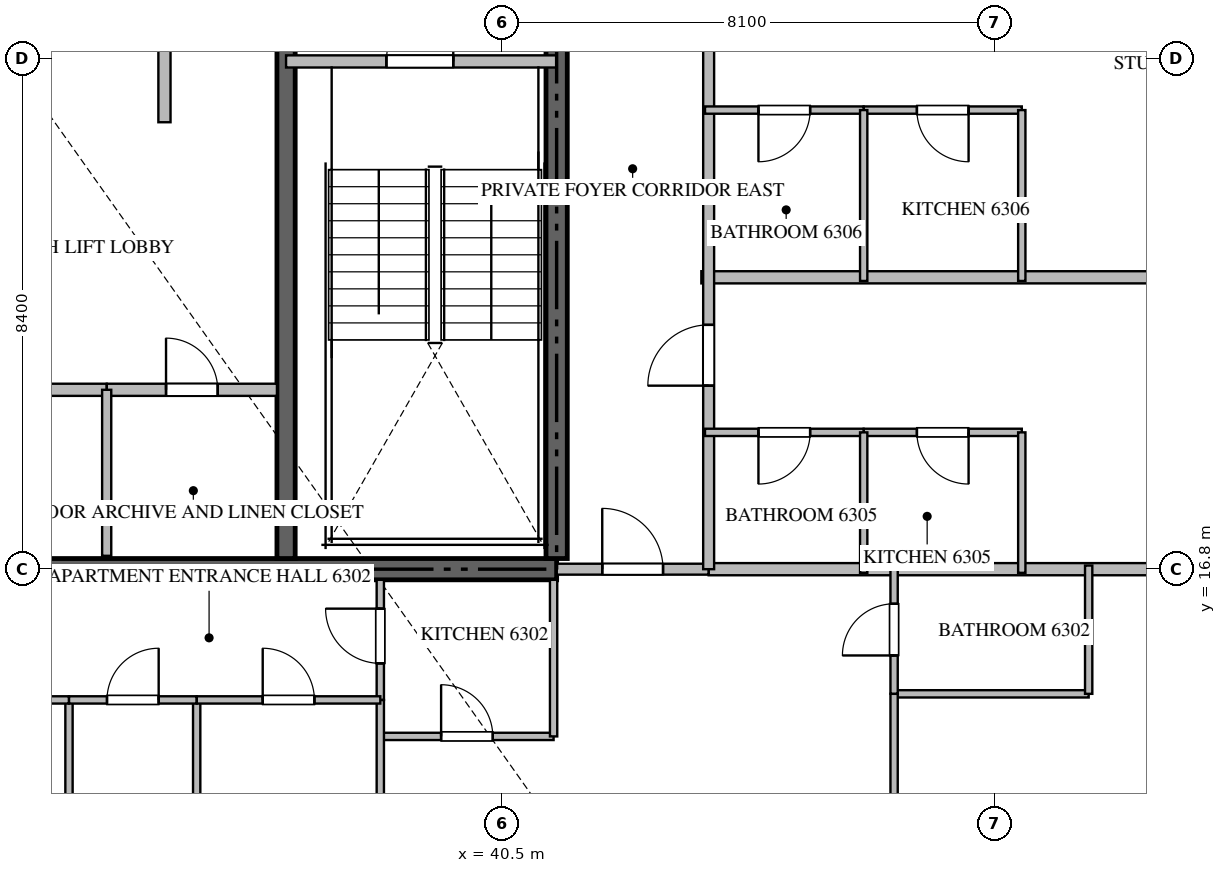
"""IFC4 building model, lengths in metres.
Left out: names, types, materials, properties, quantities, classifications, styles, units other than length and angle.
Written with IfcOpenShell. Run it as: python <this file> out.ifc"""

import sys

from ifc_helpers import new_model, si_unit, direction, frame, frame_2d, origin, place, context, subcontext, project, spatial, rectangle, extrude, source, transform, mapped, element, fill, save


model = new_model("IFC4")
c1 = context("Model", 3, precision=1e-05, world=origin(), true_north=direction((0.0, 1.0)))
c2 = subcontext(c1, "Body", "Model", "MODEL_VIEW")
j1 = project(units=[si_unit("LENGTHUNIT", "METRE"), si_unit("PLANEANGLEUNIT", "RADIAN")], contexts=[c1])
p1 = place(None, origin())
s1 = spatial("IfcSite", under=j1, at=p1, CompositionType="ELEMENT")
p2 = place(p1, origin())
s2 = spatial("IfcBuilding", under=s1, at=p2, CompositionType="ELEMENT")
p3 = place(p2, frame((0.0, 0.0, 252.8)))
s3 = spatial("IfcBuildingStorey", under=s2, at=p3, CompositionType="ELEMENT", Elevation=252.8)
p4 = place(p3, frame((23.4, 16.8, -0.26), z_axis=(0.0, 0.0, 1.0), x_axis=(1.0, 0.0, 0.0)))
e1 = element("IfcWall", 1, at=p4, inside=s3, PredefinedType="SHEAR", context=c2, shape_type="SweptSolid", body=[
    extrude(rectangle(XDim=18.0, YDim=0.35, at=frame_2d((9.0, 0.0))), origin(), (0.0, 0.0, 1.0), 3.848),
])
p5 = place(p3, frame((41.4, 16.975, -0.26), z_axis=(0.0, 0.0, 1.0), x_axis=(0.0, 1.0, 0.0)))
e2 = element("IfcWall", 2, at=p5, inside=s3, PredefinedType="SHEAR", context=c2, shape_type="SweptSolid", body=[
    extrude(rectangle(XDim=8.375, YDim=0.35, at=frame_2d((4.188, 0.0))), origin(), (0.0, 0.0, 1.0), 3.848),
])
p6 = place(p3, frame((36.95, 16.975, -0.26), z_axis=(0.0, 0.0, 1.0), x_axis=(0.0, 1.0, 0.0)))
e3 = element("IfcWall", 3, at=p6, inside=s3, PredefinedType="SHEAR", context=c2, shape_type="SweptSolid", body=[
    extrude(rectangle(XDim=8.375, YDim=0.3, at=frame_2d((4.188, 0.0))), origin(), (0.0, 0.0, 1.0), 3.848),
])
p7 = place(p3, frame((36.95, 25.15, 0.0), z_axis=(0.0, 0.0, 1.0), x_axis=(1.0, 0.0, 0.0)))
e4 = element("IfcWall", 4, at=p7, inside=s3, PredefinedType="STANDARD", context=c2, shape_type="SweptSolid", body=[
    extrude(rectangle(XDim=4.45, YDim=0.2, at=frame_2d((2.225, 0.0))), origin(), (0.0, 0.0, 1.0), 3.59),
])
p8 = place(p7, frame((1.65, 0.0, 0.0)))
e5 = element("IfcOpeningElement", 5, at=p8, cuts=e4, PredefinedType="OPENING", context=c2, shape_type="SweptSolid", body=[
    extrude(rectangle(XDim=1.1, YDim=2.15, at=frame_2d((0.55, 1.075))), frame((0.0, 0.11, 0.0), z_axis=(0.0, -1.0, 0.0), x_axis=(1.0, 0.0, 0.0)), (0.0, 0.0, 1.0), 0.22),
])
p9 = place(p3, frame((28.0, 19.75, 0.0), z_axis=(0.0, 0.0, 1.0), x_axis=(1.0, 0.0, 0.0)))
e6 = element("IfcWall", 6, at=p9, inside=s3, PredefinedType="STANDARD", context=c2, shape_type="SweptSolid", body=[
    extrude(rectangle(XDim=6.0, YDim=0.2, at=frame_2d((3.0, 0.0))), origin(), (0.0, 0.0, 1.0), 3.59),
])
p10 = place(p9, frame((2.55, 0.0, 0.0)))
e7 = element("IfcOpeningElement", 7, at=p10, cuts=e6, PredefinedType="OPENING", context=c2, shape_type="SweptSolid", body=[
    extrude(rectangle(XDim=0.9, YDim=2.1, at=frame_2d((0.45, 1.05))), frame((0.0, 0.11, 0.0), z_axis=(0.0, -1.0, 0.0), x_axis=(1.0, 0.0, 0.0)), (0.0, 0.0, 1.0), 0.22),
])
p11 = place(p3, frame((34.002, 19.75, 0.0), z_axis=(0.0, 0.0, 1.0), x_axis=(1.0, 0.0, 0.0)))
e8 = element("IfcWall", 8, at=p11, inside=s3, PredefinedType="STANDARD", context=c2, shape_type="SweptSolid", body=[
    extrude(rectangle(XDim=2.798, YDim=0.2, at=frame_2d((1.399, 0.0))), origin(), (0.0, 0.0, 1.0), 3.59),
])
p12 = place(p11, frame((0.974, 0.0, 0.0)))
e9 = element("IfcOpeningElement", 9, at=p12, cuts=e8, PredefinedType="OPENING", context=c2, shape_type="SweptSolid", body=[
    extrude(rectangle(XDim=0.85, YDim=2.1, at=frame_2d((0.425, 1.05))), frame((0.0, 0.11, 0.0), z_axis=(0.0, -1.0, 0.0), x_axis=(1.0, 0.0, 0.0)), (0.0, 0.0, 1.0), 0.22),
])
p13 = place(p3, frame((34.0, 17.02, 0.0), z_axis=(0.0, 0.0, 1.0), x_axis=(0.0, 1.0, 0.0)))
e10 = element("IfcWall", 10, at=p13, inside=s3, PredefinedType="PARTITIONING", context=c2, shape_type="SweptSolid", body=[
    extrude(rectangle(XDim=2.73, YDim=0.15, at=frame_2d((1.365, 0.0))), origin(), (0.0, 0.0, 1.0), 3.59),
])
p14 = place(p3, frame((34.95, 24.15, 0.0), z_axis=(0.0, 0.0, 1.0), x_axis=(0.0, 1.0, 0.0)))
e11 = element("IfcWall", 11, at=p14, inside=s3, PredefinedType="STANDARD", context=c2, shape_type="SweptSolid", body=[
    extrude(rectangle(XDim=2.8, YDim=0.2, at=frame_2d((1.4, 0.0))), origin(), (0.0, 0.0, 1.0), 3.59),
])
p15 = place(p3, frame((43.78, 21.6, 0.0), z_axis=(0.0, 0.0, 1.0), x_axis=(1.0, 0.0, 0.0)))
e12 = element("IfcWall", 12, at=p15, inside=s3, PredefinedType="PARTITIONING", context=c2, shape_type="SweptSolid", body=[
    extrude(rectangle(XDim=13.538, YDim=0.2, at=frame_2d((6.769, 0.0))), origin(), (0.0, 0.0, 1.0), 3.59),
])
p16 = place(p3, frame((43.9, 16.8, 0.0), z_axis=(0.0, 0.0, 1.0), x_axis=(1.0, 0.0, 0.0)))
e13 = element("IfcWall", 13, at=p16, inside=s3, PredefinedType="PARTITIONING", context=c2, shape_type="SweptSolid", body=[
    extrude(rectangle(XDim=13.418, YDim=0.2, at=frame_2d((6.709, 0.0))), origin(), (0.0, 0.0, 1.0), 3.59),
])
p17 = place(p3, frame((41.402, 16.8, 0.0), z_axis=(0.0, 0.0, 1.0), x_axis=(1.0, 0.0, 0.0)))
e14 = element("IfcWall", 14, at=p17, inside=s3, PredefinedType="PARTITIONING", context=c2, shape_type="SweptSolid", body=[
    extrude(rectangle(XDim=2.496, YDim=0.18, at=frame_2d((1.248, 0.0))), origin(), (0.0, 0.0, 1.0), 3.59),
])
p18 = place(p17, frame((0.748, 0.0, 0.0)))
e15 = element("IfcOpeningElement", 15, at=p18, cuts=e14, PredefinedType="OPENING", context=c2, shape_type="SweptSolid", body=[
    extrude(rectangle(XDim=1.0, YDim=2.15, at=frame_2d((0.5, 1.075))), frame((0.0, 0.1, 0.0), z_axis=(0.0, -1.0, 0.0), x_axis=(1.0, 0.0, 0.0)), (0.0, 0.0, 1.0), 0.2),
])
p19 = place(p3, frame((43.9, 16.8, 0.0), z_axis=(0.0, 0.0, 1.0), x_axis=(0.0, 1.0, 0.0)))
e16 = element("IfcWall", 16, at=p19, inside=s3, PredefinedType="PARTITIONING", context=c2, shape_type="SweptSolid", body=[
    extrude(rectangle(XDim=16.8, YDim=0.18, at=frame_2d((8.4, 0.0))), origin(), (0.0, 0.0, 1.0), 3.59),
])
p20 = place(p19, frame((3.018, 0.0, 0.0)))
e17 = element("IfcOpeningElement", 17, at=p20, cuts=e16, PredefinedType="OPENING", context=c2, shape_type="SweptSolid", body=[
    extrude(rectangle(XDim=1.0, YDim=2.15, at=frame_2d((0.5, 1.075))), frame((0.0, 0.1, 0.0), z_axis=(0.0, -1.0, 0.0), x_axis=(1.0, 0.0, 0.0)), (0.0, 0.0, 1.0), 0.2),
])
p21 = place(p19, frame((9.18, 0.0, 0.0)))
e18 = element("IfcOpeningElement", 18, at=p21, cuts=e16, PredefinedType="OPENING", context=c2, shape_type="SweptSolid", body=[
    extrude(rectangle(XDim=1.0, YDim=2.15, at=frame_2d((0.5, 1.075))), frame((0.0, 0.1, 0.0), z_axis=(0.0, -1.0, 0.0), x_axis=(1.0, 0.0, 0.0)), (0.0, 0.0, 1.0), 0.2),
])
p22 = place(p19, frame((14.5, 0.0, 0.0)))
e19 = element("IfcOpeningElement", 19, at=p22, cuts=e16, PredefinedType="OPENING", context=c2, shape_type="SweptSolid", body=[
    extrude(rectangle(XDim=1.0, YDim=2.15, at=frame_2d((0.5, 1.075))), frame((0.0, 0.1, 0.0), z_axis=(0.0, -1.0, 0.0), x_axis=(1.0, 0.0, 0.0)), (0.0, 0.0, 1.0), 0.2),
])
p23 = place(p3, frame((38.5, 14.05, 0.0), z_axis=(0.0, 0.0, 1.0), x_axis=(1.0, 0.0, 0.0)))
e20 = element("IfcWall", 20, at=p23, inside=s3, PredefinedType="PARTITIONING", context=c2, shape_type="SweptSolid", body=[
    extrude(rectangle(XDim=2.85, YDim=0.12, at=frame_2d((1.425, 0.0))), origin(), (0.0, 0.0, 1.0), 3.59),
])
p24 = place(p23, frame((1.0, 0.0, 0.0)))
e21 = element("IfcOpeningElement", 21, at=p24, cuts=e20, PredefinedType="OPENING", context=c2, shape_type="SweptSolid", body=[
    extrude(rectangle(XDim=0.85, YDim=2.1, at=frame_2d((0.425, 1.05))), frame((0.0, 0.07, 0.0), z_axis=(0.0, -1.0, 0.0), x_axis=(1.0, 0.0, 0.0)), (0.0, 0.0, 1.0), 0.14),
])
p25 = place(p3, frame((41.35, 14.05, 0.0), z_axis=(0.0, 0.0, 1.0), x_axis=(0.0, 1.0, 0.0)))
e22 = element("IfcWall", 22, at=p25, inside=s3, PredefinedType="PARTITIONING", context=c2, shape_type="SweptSolid", body=[
    extrude(rectangle(XDim=2.575, YDim=0.12, at=frame_2d((1.288, 0.0))), origin(), (0.0, 0.0, 1.0), 3.59),
])
p26 = place(p3, frame((38.5, 14.65, 0.0), z_axis=(0.0, 0.0, 1.0), x_axis=(0.0, 1.0, 0.0)))
e23 = element("IfcWall", 23, at=p26, inside=s3, PredefinedType="PARTITIONING", context=c2, shape_type="SweptSolid", body=[
    extrude(rectangle(XDim=1.975, YDim=0.12, at=frame_2d((0.988, 0.0))), origin(), (0.0, 0.0, 1.0), 3.59),
])
p27 = place(p26, frame((0.601, 0.0, 0.0)))
e24 = element("IfcOpeningElement", 24, at=p27, cuts=e23, PredefinedType="OPENING", context=c2, shape_type="SweptSolid", body=[
    extrude(rectangle(XDim=0.9, YDim=2.1, at=frame_2d((0.45, 1.05))), frame((0.0, 0.07, 0.0), z_axis=(0.0, -1.0, 0.0), x_axis=(1.0, 0.0, 0.0)), (0.0, 0.0, 1.0), 0.14),
])
p28 = place(p3, frame((38.5, 8.191, 0.0), z_axis=(0.0, 0.0, 1.0), x_axis=(0.0, 1.0, 0.0)))
e25 = element("IfcWall", 25, at=p28, inside=s3, PredefinedType="PARTITIONING", context=c2, shape_type="SweptSolid", body=[
    extrude(rectangle(XDim=6.457, YDim=0.12, at=frame_2d((3.229, 0.0))), origin(), (0.0, 0.0, 1.0), 3.59),
])
p29 = place(p3, frame((33.38, 1.295, 0.0), z_axis=(0.0, 0.0, 1.0), x_axis=(0.0, 1.0, 0.0)))
e26 = element("IfcWall", 26, at=p29, inside=s3, PredefinedType="PARTITIONING", context=c2, shape_type="SweptSolid", body=[
    extrude(rectangle(XDim=13.355, YDim=0.12, at=frame_2d((6.677, 0.0))), origin(), (0.0, 0.0, 1.0), 3.59),
])
p30 = place(p3, frame((35.48, 8.189, 0.0), z_axis=(0.0, 0.0, 1.0), x_axis=(0.0, 1.0, 0.0)))
e27 = element("IfcWall", 27, at=p30, inside=s3, PredefinedType="PARTITIONING", context=c2, shape_type="SweptSolid", body=[
    extrude(rectangle(XDim=6.461, YDim=0.12, at=frame_2d((3.23, 0.0))), origin(), (0.0, 0.0, 1.0), 3.59),
])
p31 = place(p3, frame((33.38, 14.65, 0.0), z_axis=(0.0, 0.0, 1.0), x_axis=(1.0, 0.0, 0.0)))
e28 = element("IfcWall", 28, at=p31, inside=s3, PredefinedType="PARTITIONING", context=c2, shape_type="SweptSolid", body=[
    extrude(rectangle(XDim=2.1, YDim=0.12, at=frame_2d((1.05, 0.0))), origin(), (0.0, 0.0, 1.0), 3.59),
])
p32 = place(p31, frame((0.625, 0.0, 0.0)))
e29 = element("IfcOpeningElement", 29, at=p32, cuts=e28, PredefinedType="OPENING", context=c2, shape_type="SweptSolid", body=[
    extrude(rectangle(XDim=0.85, YDim=2.1, at=frame_2d((0.425, 1.05))), frame((0.0, 0.07, 0.0), z_axis=(0.0, -1.0, 0.0), x_axis=(1.0, 0.0, 0.0)), (0.0, 0.0, 1.0), 0.14),
])
p33 = place(p3, frame((35.482, 14.65, 0.0), z_axis=(0.0, 0.0, 1.0), x_axis=(1.0, 0.0, 0.0)))
e30 = element("IfcWall", 30, at=p33, inside=s3, PredefinedType="PARTITIONING", context=c2, shape_type="SweptSolid", body=[
    extrude(rectangle(XDim=3.018, YDim=0.12, at=frame_2d((1.509, 0.0))), origin(), (0.0, 0.0, 1.0), 3.59),
])
p34 = place(p33, frame((1.084, 0.0, 0.0)))
e31 = element("IfcOpeningElement", 31, at=p34, cuts=e30, PredefinedType="OPENING", context=c2, shape_type="SweptSolid", body=[
    extrude(rectangle(XDim=0.85, YDim=2.1, at=frame_2d((0.425, 1.05))), frame((0.0, 0.07, 0.0), z_axis=(0.0, -1.0, 0.0), x_axis=(1.0, 0.0, 0.0)), (0.0, 0.0, 1.0), 0.14),
])
p35 = place(p3, frame((31.03, 14.65, 0.0), z_axis=(0.0, 0.0, 1.0), x_axis=(1.0, 0.0, 0.0)))
e32 = element("IfcWall", 32, at=p35, inside=s3, PredefinedType="PARTITIONING", context=c2, shape_type="SweptSolid", body=[
    extrude(rectangle(XDim=2.348, YDim=0.12, at=frame_2d((1.174, 0.0))), origin(), (0.0, 0.0, 1.0), 3.59),
])
p36 = place(p35, frame((0.724, 0.0, 0.0)))
e33 = element("IfcOpeningElement", 33, at=p36, cuts=e32, PredefinedType="OPENING", context=c2, shape_type="SweptSolid", body=[
    extrude(rectangle(XDim=0.9, YDim=2.1, at=frame_2d((0.45, 1.05))), frame((0.0, 0.07, 0.0), z_axis=(0.0, -1.0, 0.0), x_axis=(1.0, 0.0, 0.0)), (0.0, 0.0, 1.0), 0.14),
])
p37 = place(p3, frame((46.95, 14.75, 0.0), z_axis=(0.0, 0.0, 1.0), x_axis=(1.0, 0.0, 0.0)))
e34 = element("IfcWall", 34, at=p37, inside=s3, PredefinedType="PARTITIONING", context=c2, shape_type="SweptSolid", body=[
    extrude(rectangle(XDim=3.2, YDim=0.12, at=frame_2d((1.6, 0.0))), origin(), (0.0, 0.0, 1.0), 3.59),
])
p38 = place(p3, frame((50.15, 14.75, 0.0), z_axis=(0.0, 0.0, 1.0), x_axis=(0.0, 1.0, 0.0)))
e35 = element("IfcWall", 35, at=p38, inside=s3, PredefinedType="PARTITIONING", context=c2, shape_type="SweptSolid", body=[
    extrude(rectangle(XDim=2.11, YDim=0.12, at=frame_2d((1.055, 0.0))), origin(), (0.0, 0.0, 1.0), 3.59),
])
p39 = place(p3, frame((46.95, 8.67, 0.0), z_axis=(0.0, 0.0, 1.0), x_axis=(0.0, 1.0, 0.0)))
e36 = element("IfcWall", 36, at=p39, inside=s3, PredefinedType="PARTITIONING", context=c2, shape_type="SweptSolid", body=[
    extrude(rectangle(XDim=6.08, YDim=0.12, at=frame_2d((3.04, 0.0))), origin(), (0.0, 0.0, 1.0), 3.59),
])
p40 = place(p39, frame((2.615, 0.0, 0.0)))
e37 = element("IfcOpeningElement", 37, at=p40, cuts=e36, PredefinedType="OPENING", context=c2, shape_type="SweptSolid", body=[
    extrude(rectangle(XDim=0.85, YDim=2.1, at=frame_2d((0.425, 1.05))), frame((0.0, 0.07, 0.0), z_axis=(0.0, -1.0, 0.0), x_axis=(1.0, 0.0, 0.0)), (0.0, 0.0, 1.0), 0.14),
])
p41 = place(p3, frame((46.95, 14.752, 0.0), z_axis=(0.0, 0.0, 1.0), x_axis=(0.0, 1.0, 0.0)))
e38 = element("IfcWall", 38, at=p41, inside=s3, PredefinedType="PARTITIONING", context=c2, shape_type="SweptSolid", body=[
    extrude(rectangle(XDim=2.108, YDim=0.12, at=frame_2d((1.054, 0.0))), origin(), (0.0, 0.0, 1.0), 3.59),
])
p42 = place(p41, frame((0.629, 0.0, 0.0)))
e39 = element("IfcOpeningElement", 39, at=p42, cuts=e38, PredefinedType="OPENING", context=c2, shape_type="SweptSolid", body=[
    extrude(rectangle(XDim=0.85, YDim=2.1, at=frame_2d((0.425, 1.05))), frame((0.0, 0.07, 0.0), z_axis=(0.0, -1.0, 0.0), x_axis=(1.0, 0.0, 0.0)), (0.0, 0.0, 1.0), 0.14),
])
p43 = place(p3, frame((49.05, 19.05, 0.0), z_axis=(0.0, 0.0, 1.0), x_axis=(-1.0, 0.0, 0.0)))
e40 = element("IfcWall", 40, at=p43, inside=s3, PredefinedType="PARTITIONING", context=c2, shape_type="SweptSolid", body=[
    extrude(rectangle(XDim=2.6, YDim=0.12, at=frame_2d((1.3, 0.0))), origin(), (0.0, 0.0, 1.0), 3.59),
])
p44 = place(p43, frame((0.875, 0.0, 0.0)))
e41 = element("IfcOpeningElement", 41, at=p44, cuts=e40, PredefinedType="OPENING", context=c2, shape_type="SweptSolid", body=[
    extrude(rectangle(XDim=0.85, YDim=2.1, at=frame_2d((0.425, 1.05))), frame((0.0, 0.07, 0.0), z_axis=(0.0, -1.0, 0.0), x_axis=(1.0, 0.0, 0.0)), (0.0, 0.0, 1.0), 0.14),
])
p45 = place(p3, frame((46.448, 19.05, 0.0), z_axis=(0.0, 0.0, 1.0), x_axis=(-1.0, 0.0, 0.0)))
e42 = element("IfcWall", 42, at=p45, inside=s3, PredefinedType="PARTITIONING", context=c2, shape_type="SweptSolid", body=[
    extrude(rectangle(XDim=2.608, YDim=0.12, at=frame_2d((1.304, 0.0))), origin(), (0.0, 0.0, 1.0), 3.59),
])
p46 = place(p45, frame((0.879, 0.0, 0.0)))
e43 = element("IfcOpeningElement", 43, at=p46, cuts=e42, PredefinedType="OPENING", context=c2, shape_type="SweptSolid", body=[
    extrude(rectangle(XDim=0.85, YDim=2.1, at=frame_2d((0.425, 1.05))), frame((0.0, 0.07, 0.0), z_axis=(0.0, -1.0, 0.0), x_axis=(1.0, 0.0, 0.0)), (0.0, 0.0, 1.0), 0.14),
])
for number, where, z_axis, x_axis in (
    (44, (46.45, 16.74, 0.0), (0.0, 0.0, 1.0), (0.0, 1.0, 0.0)),
    (45, (49.05, 16.74, 0.0), (0.0, 0.0, 1.0), (0.0, 1.0, 0.0)),
):
    element("IfcWall", number, at=place(p3, frame(where, z_axis=z_axis, x_axis=x_axis)), inside=s3, PredefinedType="PARTITIONING", context=c2, shape_type="SweptSolid", body=[
        extrude(rectangle(XDim=2.31, YDim=0.12, at=frame_2d((1.155, 0.0))), origin(), (0.0, 0.0, 1.0), 3.59),
    ])
p47 = place(p3, frame((49.05, 24.35, 0.0), z_axis=(0.0, 0.0, 1.0), x_axis=(-1.0, 0.0, 0.0)))
e46 = element("IfcWall", 46, at=p47, inside=s3, PredefinedType="PARTITIONING", context=c2, shape_type="SweptSolid", body=[
    extrude(rectangle(XDim=2.6, YDim=0.12, at=frame_2d((1.3, 0.0))), origin(), (0.0, 0.0, 1.0), 3.59),
])
p48 = place(p47, frame((0.875, 0.0, 0.0)))
e47 = element("IfcOpeningElement", 47, at=p48, cuts=e46, PredefinedType="OPENING", context=c2, shape_type="SweptSolid", body=[
    extrude(rectangle(XDim=0.85, YDim=2.1, at=frame_2d((0.425, 1.05))), frame((0.0, 0.07, 0.0), z_axis=(0.0, -1.0, 0.0), x_axis=(1.0, 0.0, 0.0)), (0.0, 0.0, 1.0), 0.14),
])
p49 = place(p3, frame((46.448, 24.35, 0.0), z_axis=(0.0, 0.0, 1.0), x_axis=(-1.0, 0.0, 0.0)))
e48 = element("IfcWall", 48, at=p49, inside=s3, PredefinedType="PARTITIONING", context=c2, shape_type="SweptSolid", body=[
    extrude(rectangle(XDim=2.608, YDim=0.12, at=frame_2d((1.304, 0.0))), origin(), (0.0, 0.0, 1.0), 3.59),
])
p50 = place(p49, frame((0.879, 0.0, 0.0)))
e49 = element("IfcOpeningElement", 49, at=p50, cuts=e48, PredefinedType="OPENING", context=c2, shape_type="SweptSolid", body=[
    extrude(rectangle(XDim=0.85, YDim=2.1, at=frame_2d((0.425, 1.05))), frame((0.0, 0.07, 0.0), z_axis=(0.0, -1.0, 0.0), x_axis=(1.0, 0.0, 0.0)), (0.0, 0.0, 1.0), 0.14),
])
for number, where, z_axis, x_axis in (
    (50, (46.45, 21.54, 0.0), (0.0, 0.0, 1.0), (0.0, 1.0, 0.0)),
    (51, (49.05, 21.54, 0.0), (0.0, 0.0, 1.0), (0.0, 1.0, 0.0)),
):
    element("IfcWall", number, at=place(p3, frame(where, z_axis=z_axis, x_axis=x_axis)), inside=s3, PredefinedType="PARTITIONING", context=c2, shape_type="SweptSolid", body=[
        extrude(rectangle(XDim=2.81, YDim=0.12, at=frame_2d((1.405, 0.0))), origin(), (0.0, 0.0, 1.0), 3.59),
    ])
m1 = source(origin(), c2, "Body", "SweptSolid", [
    extrude(rectangle(XDim=1.1, YDim=2.15, at=frame_2d((0.55, 1.075))), frame((0.0, 0.025, 0.0), z_axis=(0.0, -1.0, 0.0), x_axis=(1.0, 0.0, 0.0)), (0.0, 0.0, 1.0), 0.05),
])
p51 = place(p8, origin())
e52 = element("IfcDoor", 52, at=p51, inside=s3, OperationType="SINGLE_SWING_RIGHT", PredefinedType="DOOR", context=c2, shape_type="MappedRepresentation", body=[
    mapped(m1, transform((0.0, 0.0, 0.0), scale=1.0)),
])
fill(e5, e52)
m2 = source(origin(), c2, "Body", "SweptSolid", [
    extrude(rectangle(XDim=0.85, YDim=2.1, at=frame_2d((0.425, 1.05))), frame((0.0, 0.025, 0.0), z_axis=(0.0, -1.0, 0.0), x_axis=(1.0, 0.0, 0.0)), (0.0, 0.0, 1.0), 0.05),
])
p52 = place(p12, origin())
e53 = element("IfcDoor", 53, at=p52, inside=s3, OperationType="SINGLE_SWING_LEFT", PredefinedType="DOOR", context=c2, shape_type="MappedRepresentation", body=[
    mapped(m2, transform((0.0, 0.0, 0.0), scale=1.0)),
])
fill(e9, e53)
m3 = source(origin(), c2, "Body", "SweptSolid", [
    extrude(rectangle(XDim=1.0, YDim=2.15, at=frame_2d((0.5, 1.075))), frame((0.0, 0.025, 0.0), z_axis=(0.0, -1.0, 0.0), x_axis=(1.0, 0.0, 0.0)), (0.0, 0.0, 1.0), 0.05),
])
p53 = place(p18, origin())
e54 = element("IfcDoor", 54, at=p53, inside=s3, OperationType="SINGLE_SWING_LEFT", PredefinedType="DOOR", context=c2, shape_type="MappedRepresentation", body=[
    mapped(m3, transform((0.0, 0.0, 0.0), scale=1.0)),
])
fill(e15, e54)
p54 = place(p20, origin())
e55 = element("IfcDoor", 55, at=p54, inside=s3, OperationType="SINGLE_SWING_LEFT", PredefinedType="DOOR", context=c2, shape_type="MappedRepresentation", body=[
    mapped(m3, transform((0.0, 0.0, 0.0), scale=1.0)),
])
fill(e17, e55)
p55 = place(p24, origin())
e56 = element("IfcDoor", 56, at=p55, inside=s3, OperationType="SINGLE_SWING_LEFT", PredefinedType="DOOR", context=c2, shape_type="MappedRepresentation", body=[
    mapped(m2, transform((0.0, 0.0, 0.0), scale=1.0)),
])
fill(e21, e56)
m4 = source(origin(), c2, "Body", "SweptSolid", [
    extrude(rectangle(XDim=0.9, YDim=2.1, at=frame_2d((0.45, 1.05))), frame((0.0, 0.025, 0.0), z_axis=(0.0, -1.0, 0.0), x_axis=(1.0, 0.0, 0.0)), (0.0, 0.0, 1.0), 0.05),
])
p56 = place(p27, origin())
e57 = element("IfcDoor", 57, at=p56, inside=s3, OperationType="SINGLE_SWING_RIGHT", PredefinedType="DOOR", context=c2, shape_type="MappedRepresentation", body=[
    mapped(m4, transform((0.0, 0.0, 0.0), scale=1.0)),
])
fill(e24, e57)
p57 = place(p32, origin())
e58 = element("IfcDoor", 58, at=p57, inside=s3, OperationType="SINGLE_SWING_RIGHT", PredefinedType="DOOR", context=c2, shape_type="MappedRepresentation", body=[
    mapped(m2, transform((0.0, 0.0, 0.0), scale=1.0)),
])
fill(e29, e58)
p58 = place(p34, origin())
e59 = element("IfcDoor", 59, at=p58, inside=s3, OperationType="SINGLE_SWING_LEFT", PredefinedType="DOOR", context=c2, shape_type="MappedRepresentation", body=[
    mapped(m2, transform((0.0, 0.0, 0.0), scale=1.0)),
])
fill(e31, e59)
p59 = place(p42, origin())
e60 = element("IfcDoor", 60, at=p59, inside=s3, OperationType="SINGLE_SWING_LEFT", PredefinedType="DOOR", context=c2, shape_type="MappedRepresentation", body=[
    mapped(m2, transform((0.0, 0.0, 0.0), scale=1.0)),
])
fill(e39, e60)
p60 = place(p44, origin())
e61 = element("IfcDoor", 61, at=p60, inside=s3, OperationType="SINGLE_SWING_LEFT", PredefinedType="DOOR", context=c2, shape_type="MappedRepresentation", body=[
    mapped(m2, transform((0.0, 0.0, 0.0), scale=1.0)),
])
fill(e41, e61)
p61 = place(p46, origin())
e62 = element("IfcDoor", 62, at=p61, inside=s3, OperationType="SINGLE_SWING_RIGHT", PredefinedType="DOOR", context=c2, shape_type="MappedRepresentation", body=[
    mapped(m2, transform((0.0, 0.0, 0.0), scale=1.0)),
])
fill(e43, e62)
p62 = place(p48, origin())
e63 = element("IfcDoor", 63, at=p62, inside=s3, OperationType="SINGLE_SWING_LEFT", PredefinedType="DOOR", context=c2, shape_type="MappedRepresentation", body=[
    mapped(m2, transform((0.0, 0.0, 0.0), scale=1.0)),
])
fill(e47, e63)
p63 = place(p50, origin())
e64 = element("IfcDoor", 64, at=p63, inside=s3, OperationType="SINGLE_SWING_RIGHT", PredefinedType="DOOR", context=c2, shape_type="MappedRepresentation", body=[
    mapped(m2, transform((0.0, 0.0, 0.0), scale=1.0)),
])
fill(e49, e64)
save(model, sys.argv[1])
